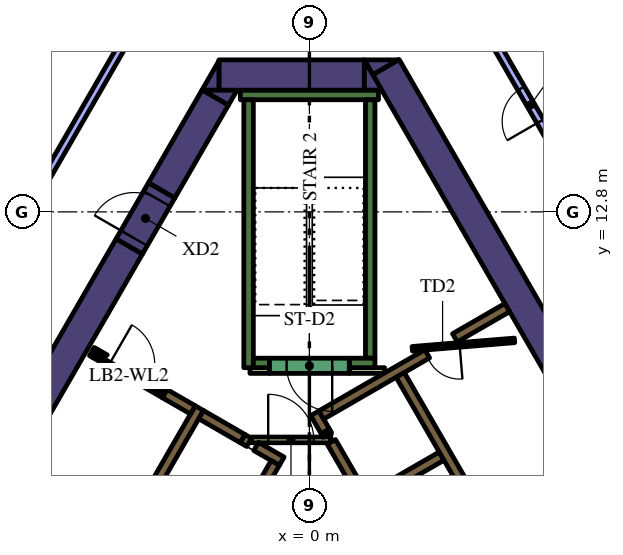
"""IFC4 building model, lengths in metres.
Left out: names, types, materials, properties, quantities, classifications, styles, units other than length and angle.
Written with IfcOpenShell. Run it as: python <this file> out.ifc"""

import sys

from ifc_helpers import new_model, si_unit, direction, frame, frame_2d, origin, place, context, subcontext, project, spatial, polyline, rectangle, outline, extrude, element, fill, save


model = new_model("IFC4")
c1 = context("Model", 3, precision=1e-05, world=origin(), true_north=direction((0.0, 1.0)))
c2 = subcontext(c1, "Body", "Model", "MODEL_VIEW")
j1 = project(units=[si_unit("LENGTHUNIT", "METRE"), si_unit("PLANEANGLEUNIT", "RADIAN")], contexts=[c1])
p1 = place(None, origin())
s1 = spatial("IfcSite", under=j1, at=p1, CompositionType="ELEMENT")
p2 = place(p1, origin())
s2 = spatial("IfcBuilding", under=s1, at=p2, CompositionType="ELEMENT")
p3 = place(p2, frame((0.0, 0.0, 171.0)))
s3 = spatial("IfcBuildingStorey", under=s2, at=p3, CompositionType="ELEMENT", Elevation=171.0)
p4 = place(p3, frame((8.279, 5.761, 0.0), z_axis=(0.0, 0.0, 1.0), x_axis=(-0.500010359015, 0.866019422922, 0.0)))
e1 = element("IfcWall", 1, at=p4, inside=s3, PredefinedType="SOLIDWALL", context=c2, shape_type="SweptSolid", body=[
    extrude(rectangle(XDim=12.528, YDim=0.8, at=frame_2d((6.264, 0.0))), origin(), (0.0, 0.0, 1.0), 4.2),
])
p5 = place(p3, origin())
e2 = element("IfcWall", 2, at=p5, inside=s3, PredefinedType="SOLIDWALL", context=c2, shape_type="SweptSolid", body=[
    extrude(outline(polyline([(1.443, 16.8), (2.339, 16.8), (1.667, 16.412), (1.443, 16.8)])), origin(), (0.0, 0.0, 1.0), 4.2),
])
p6 = place(p3, frame((-2.379, 16.4, 0.0), z_axis=(0.0, 0.0, 1.0), x_axis=(1.0, 0.0, 0.0)))
e3 = element("IfcWall", 3, at=p6, inside=s3, PredefinedType="SOLIDWALL", context=c2, shape_type="SweptSolid", body=[
    extrude(rectangle(XDim=3.824, YDim=0.8, at=frame_2d((1.912, 0.0))), origin(), (0.0, 0.0, 1.0), 4.2),
])
e4 = element("IfcWall", 4, at=p5, inside=s3, PredefinedType="SOLIDWALL", context=c2, shape_type="SweptSolid", body=[
    extrude(outline(polyline([(1.905, 16.0), (1.447, 16.0), (1.447, 16.793), (1.905, 16.0)])), origin(), (0.0, 0.0, 1.0), 4.2),
])
e5 = element("IfcWall", 5, at=p5, inside=s3, PredefinedType="SOLIDWALL", context=c2, shape_type="SweptSolid", body=[
    extrude(outline(polyline([(-2.829, 16.0), (-2.381, 16.776), (-2.381, 16.0), (-2.829, 16.0)])), origin(), (0.0, 0.0, 1.0), 4.2),
])
p7 = place(p3, frame((-2.477, 15.81, 0.0), z_axis=(0.0, 0.0, 1.0), x_axis=(-0.499969377405, -0.866043083026, 0.0)))
e6 = element("IfcWall", 6, at=p7, inside=s3, PredefinedType="SOLIDWALL", context=c2, shape_type="SweptSolid", body=[
    extrude(rectangle(XDim=2.824, YDim=0.8, at=frame_2d((1.412, 0.0))), origin(), (0.0, 0.0, 1.0), 4.2),
])
e7 = element("IfcWall", 7, at=p5, inside=s3, PredefinedType="SOLIDWALL", context=c2, shape_type="SweptSolid", body=[
    extrude(outline(polyline([(-1.905, 16.0), (-2.129, 15.612), (-2.801, 16.0), (-1.905, 16.0)])), origin(), (0.0, 0.0, 1.0), 4.2),
])
p8 = place(p3, frame((-12.668, -1.842, 0.0), z_axis=(0.0, 0.0, 1.0), x_axis=(0.500003640647, 0.866023301845, 0.0)))
e8 = element("IfcWall", 8, at=p8, inside=s3, PredefinedType="SOLIDWALL", context=c2, shape_type="SweptSolid", body=[
    extrude(rectangle(XDim=15.858, YDim=0.8, at=frame_2d((7.929, 0.0))), origin(), (0.0, 0.0, 1.0), 4.2),
])
p9 = place(p3, frame((-1.817, 15.875, 0.0), z_axis=(0.0, 0.0, 1.0), x_axis=(1.0, 0.0, 0.0)))
e9 = element("IfcWall", 9, at=p9, inside=s3, PredefinedType="SOLIDWALL", context=c2, shape_type="SweptSolid", body=[
    extrude(rectangle(XDim=3.634, YDim=0.25, at=frame_2d((1.817, 0.0))), origin(), (0.0, 0.0, 1.0), 4.2),
])
p10 = place(p3, frame((1.6, 8.95, 0.0), z_axis=(0.0, 0.0, 1.0), x_axis=(0.0, 1.0, 0.0)))
e10 = element("IfcWall", 10, at=p10, inside=s3, PredefinedType="SOLIDWALL", context=c2, shape_type="SweptSolid", body=[
    extrude(rectangle(XDim=6.8, YDim=0.25, at=frame_2d((3.4, 0.0))), origin(), (0.0, 0.0, 1.0), 4.2),
])
p11 = place(p3, frame((1.05, 8.825, 0.0), z_axis=(0.0, 0.0, 1.0), x_axis=(1.0, 0.0, 0.0)))
e11 = element("IfcWall", 11, at=p11, inside=s3, PredefinedType="SOLIDWALL", context=c2, shape_type="SweptSolid", body=[
    extrude(rectangle(XDim=0.675, YDim=0.25, at=frame_2d((0.337, 0.0))), origin(), (0.0, 0.0, 1.0), 4.2),
])
p12 = place(p3, frame((-1.6, 8.7, 0.0), z_axis=(0.0, 0.0, 1.0), x_axis=(0.0, 1.0, 0.0)))
e12 = element("IfcWall", 12, at=p12, inside=s3, PredefinedType="SOLIDWALL", context=c2, shape_type="SweptSolid", body=[
    extrude(rectangle(XDim=7.05, YDim=0.25, at=frame_2d((3.525, 0.0))), origin(), (0.0, 0.0, 1.0), 4.2),
])
p13 = place(p3, frame((-1.475, 8.825, 0.0), z_axis=(0.0, 0.0, 1.0), x_axis=(1.0, 0.0, 0.0)))
e13 = element("IfcWall", 13, at=p13, inside=s3, PredefinedType="SOLIDWALL", context=c2, shape_type="SweptSolid", body=[
    extrude(rectangle(XDim=0.425, YDim=0.25, at=frame_2d((0.212, 0.0))), origin(), (0.0, 0.0, 1.0), 4.2),
])
p14 = place(p3, frame((0.473, 6.93, 0.0), z_axis=(0.0, 0.0, 1.0), x_axis=(-0.49972245349, 0.866185586049, 0.0)))
e14 = element("IfcWall", 14, at=p14, inside=s3, PredefinedType="SOLIDWALL", context=c2, shape_type="SweptSolid", body=[
    extrude(rectangle(XDim=0.11, YDim=0.25, at=frame_2d((0.055, 0.0))), origin(), (0.0, 0.0, 1.0), 4.2),
])
p15 = place(p3, frame((6.568, -3.627, 0.0), z_axis=(0.0, 0.0, 1.0), x_axis=(-0.499999455981, 0.866025717874, 0.0)))
e15 = element("IfcWall", 15, at=p15, inside=s3, PredefinedType="SOLIDWALL", context=c2, shape_type="SweptSolid", body=[
    extrude(rectangle(XDim=11.978, YDim=0.25, at=frame_2d((5.989, 0.0))), origin(), (0.0, 0.0, 1.0), 4.2),
])
p16 = place(p3, frame((0.417, 7.027, 0.0), z_axis=(0.0, 0.0, 1.0), x_axis=(-0.500210807569, 0.865903659763, 0.0)))
e16 = element("IfcWall", 16, at=p16, inside=s3, PredefinedType="SOLIDWALL", context=c2, shape_type="SweptSolid", body=[
    extrude(rectangle(XDim=0.548, YDim=0.25, at=frame_2d((0.274, 0.0))), origin(), (0.0, 0.0, 1.0), 4.2),
])
p17 = place(p3, frame((3.1, 9.064, 0.0), z_axis=(0.0, 0.0, 1.0), x_axis=(-0.866030133475, -0.499991807846, 0.0)))
e17 = element("IfcWall", 17, at=p17, inside=s3, PredefinedType="SOLIDWALL", context=c2, shape_type="SweptSolid", body=[
    extrude(rectangle(XDim=3.217, YDim=0.25, at=frame_2d((1.608, 0.0))), origin(), (0.0, 0.0, 1.0), 4.2),
])
p18 = place(p3, frame((1.574, 5.274, 0.0), z_axis=(0.0, 0.0, 1.0), x_axis=(0.866028486751, 0.499994660107, 0.0)))
e18 = element("IfcWall", 18, at=p18, inside=s3, PredefinedType="SOLIDWALL", context=c2, shape_type="SweptSolid", body=[
    extrude(rectangle(XDim=2.2, YDim=0.25, at=frame_2d((1.1, 0.0))), origin(), (0.0, 0.0, 1.0), 4.2),
])
p19 = place(p3, frame((3.83, 9.486, 0.0), z_axis=(0.0, 0.0, 1.0), x_axis=(0.865986202621, 0.500067892261, 0.0)))
e19 = element("IfcWall", 19, at=p19, inside=s3, PredefinedType="SOLIDWALL", context=c2, shape_type="SweptSolid", body=[
    extrude(rectangle(XDim=1.591, YDim=0.25, at=frame_2d((0.795, 0.0))), origin(), (0.0, 0.0, 1.0), 4.2),
])
p20 = place(p3, frame((-8.06, -1.311, 0.0), z_axis=(0.0, 0.0, 1.0), x_axis=(0.50000273126, 0.866023826885, 0.0)))
e20 = element("IfcWall", 20, at=p20, inside=s3, PredefinedType="SOLIDWALL", context=c2, shape_type="SweptSolid", body=[
    extrude(rectangle(XDim=10.33, YDim=0.25, at=frame_2d((5.165, 0.0))), origin(), (0.0, 0.0, 1.0), 4.2),
])
p21 = place(p3, frame((-1.758, 6.835, 0.0), z_axis=(0.0, 0.0, 1.0), x_axis=(0.865982457891, -0.500074377092, 0.0)))
e21 = element("IfcWall", 21, at=p21, inside=s3, PredefinedType="SOLIDWALL", context=c2, shape_type="SweptSolid", body=[
    extrude(rectangle(XDim=0.2, YDim=0.25, at=frame_2d((0.1, 0.0))), origin(), (0.0, 0.0, 1.0), 4.2),
])
p22 = place(p3, frame((-1.76, 6.836, 0.0), z_axis=(0.0, 0.0, 1.0), x_axis=(-0.865952863304, 0.500125622755, 0.0)))
e22 = element("IfcWall", 22, at=p22, inside=s3, PredefinedType="SOLIDWALL", context=c2, shape_type="SweptSolid", body=[
    extrude(rectangle(XDim=1.258, YDim=0.25, at=frame_2d((0.629, 0.0))), origin(), (0.0, 0.0, 1.0), 4.2),
])
p23 = place(p3, frame((-0.728, 6.24, 0.0), z_axis=(0.0, 0.0, 1.0), x_axis=(-0.865955664968, 0.500120771724, 0.0)))
e23 = element("IfcWall", 23, at=p23, inside=s3, PredefinedType="SOLIDWALL", context=c2, shape_type="SweptSolid", body=[
    extrude(rectangle(XDim=0.778, YDim=0.25, at=frame_2d((0.389, 0.0))), origin(), (0.0, 0.0, 1.0), 4.2),
])
p24 = place(p3, frame((-5.725, 9.125, 0.0), z_axis=(0.0, 0.0, 1.0), x_axis=(0.866185586049, -0.49972245349, 0.0)))
e24 = element("IfcWall", 24, at=p24, inside=s3, PredefinedType="SOLIDWALL", context=c2, shape_type="SweptSolid", body=[
    extrude(rectangle(XDim=0.11, YDim=0.25, at=frame_2d((0.055, 0.0))), origin(), (0.0, 0.0, 1.0), 4.2),
])
p25 = place(p3, frame((-3.066, 7.59, 0.0), z_axis=(0.0, 0.0, 1.0), x_axis=(-0.866081358704, 0.49990307071, 0.0)))
e25 = element("IfcWall", 25, at=p25, inside=s3, PredefinedType="SOLIDWALL", context=c2, shape_type="SweptSolid", body=[
    extrude(rectangle(XDim=0.858, YDim=0.25, at=frame_2d((0.429, 0.0))), origin(), (0.0, 0.0, 1.0), 4.2),
])
e26 = element("IfcWall", 26, at=p5, inside=s3, PredefinedType="SOLIDWALL", context=c2, shape_type="SweptSolid", body=[
    extrude(outline(polyline([(-3.748, 8.128), (-3.813, 8.015), (-4.027, 8.139), (-4.017, 8.156), (-4.008, 8.173), (-4.0, 8.192), (-3.995, 8.21), (-3.991, 8.23), (-3.99, 8.25), (-3.99, 8.268), (-3.748, 8.128)])), origin(), (0.0, 0.0, 1.0), 4.2),
])
e27 = element("IfcWall", 27, at=p5, inside=s3, PredefinedType="SOLIDWALL", context=c2, shape_type="SweptSolid", body=[
    extrude(outline(polyline([(-5.689, 8.96), (-5.69, 8.961), (-5.565, 9.177), (-5.319, 9.035), (-5.335, 9.026), (-5.351, 9.015), (-5.366, 9.002), (-5.379, 8.988), (-5.392, 8.972), (-5.402, 8.956), (-5.412, 8.939), (-5.629, 9.064), (-5.629, 9.064), (-5.689, 8.96)])), origin(), (0.0, 0.0, 1.0), 4.2),
])
p26 = place(p3, frame((1.05, 8.625, 0.0), z_axis=(0.0, 0.0, 1.0), x_axis=(1.0, 0.0, 0.0)))
e28 = element("IfcWall", 28, at=p26, inside=s3, PredefinedType="PARTITIONING", context=c2, shape_type="SweptSolid", body=[
    extrude(rectangle(XDim=0.929, YDim=0.15, at=frame_2d((0.464, 0.0))), origin(), (0.0, 0.0, 1.0), 3.15),
])
p27 = place(p3, frame((-1.564, 8.625, 0.0), z_axis=(0.0, 0.0, 1.0), x_axis=(1.0, 0.0, 0.0)))
e29 = element("IfcWall", 29, at=p27, inside=s3, PredefinedType="PARTITIONING", context=c2, shape_type="SweptSolid", body=[
    extrude(rectangle(XDim=0.514, YDim=0.15, at=frame_2d((0.257, 0.0))), origin(), (0.0, 0.0, 1.0), 3.15),
])
p28 = place(p3, frame((8.565, -2.185, 0.0), z_axis=(0.0, 0.0, 1.0), x_axis=(-0.499997954832, 0.866026584559, 0.0)))
e30 = element("IfcWall", 30, at=p28, inside=s3, PredefinedType="SOLIDWALL", context=c2, shape_type="SweptSolid", body=[
    extrude(rectangle(XDim=12.35, YDim=0.25, at=frame_2d((6.175, 0.0))), origin(), (0.0, 0.0, 1.0), 4.2),
])
p29 = place(p28, frame((0.585, 0.0, 0.0)))
e31 = element("IfcOpeningElement", 31, at=p29, cuts=e30, PredefinedType="OPENING", context=c2, shape_type="SweptSolid", body=[
    extrude(rectangle(XDim=1.1, YDim=2.1, at=frame_2d((0.55, 1.05))), frame((0.0, 0.135, 0.0), z_axis=(0.0, -1.0, 0.0), x_axis=(1.0, 0.0, 0.0)), (0.0, 0.0, 1.0), 0.27),
])
p30 = place(p3, frame((-0.898, 6.194, 0.0), z_axis=(0.0, 0.0, 1.0), x_axis=(-0.499996202215, -0.866027596426, 0.0)))
e32 = element("IfcWall", 32, at=p30, inside=s3, PredefinedType="SOLIDWALL", context=c2, shape_type="SweptSolid", body=[
    extrude(rectangle(XDim=9.83, YDim=0.25, at=frame_2d((4.915, 0.0))), origin(), (0.0, 0.0, 1.0), 4.2),
])
p31 = place(p30, frame((0.585, 0.0, 0.0)))
e33 = element("IfcOpeningElement", 33, at=p31, cuts=e32, PredefinedType="OPENING", context=c2, shape_type="SweptSolid", body=[
    extrude(rectangle(XDim=1.1, YDim=2.1, at=frame_2d((0.55, 1.05))), frame((0.0, 0.135, 0.0), z_axis=(0.0, -1.0, 0.0), x_axis=(1.0, 0.0, 0.0)), (0.0, 0.0, 1.0), 0.27),
])
p32 = place(p30, frame((3.105, 0.0, 0.0)))
e34 = element("IfcOpeningElement", 34, at=p32, cuts=e32, PredefinedType="OPENING", context=c2, shape_type="SweptSolid", body=[
    extrude(rectangle(XDim=1.1, YDim=2.1, at=frame_2d((0.55, 1.05))), frame((0.0, 0.135, 0.0), z_axis=(0.0, -1.0, 0.0), x_axis=(1.0, 0.0, 0.0)), (0.0, 0.0, 1.0), 0.27),
])
p33 = place(p30, frame((5.625, 0.0, 0.0)))
e35 = element("IfcOpeningElement", 35, at=p33, cuts=e32, PredefinedType="OPENING", context=c2, shape_type="SweptSolid", body=[
    extrude(rectangle(XDim=1.1, YDim=2.1, at=frame_2d((0.55, 1.05))), frame((0.0, 0.135, 0.0), z_axis=(0.0, -1.0, 0.0), x_axis=(1.0, 0.0, 0.0)), (0.0, 0.0, 1.0), 0.27),
])
p34 = place(p30, frame((8.145, 0.0, 0.0)))
e36 = element("IfcOpeningElement", 36, at=p34, cuts=e32, PredefinedType="OPENING", context=c2, shape_type="SweptSolid", body=[
    extrude(rectangle(XDim=1.1, YDim=2.1, at=frame_2d((0.55, 1.05))), frame((0.0, 0.135, 0.0), z_axis=(0.0, -1.0, 0.0), x_axis=(1.0, 0.0, 0.0)), (0.0, 0.0, 1.0), 0.27),
])
p35 = place(p3, frame((1.05, 8.75, 0.0), z_axis=(0.0, 0.0, 1.0), x_axis=(-1.0, 0.0, 0.0)))
e37 = element("IfcWall", 37, at=p35, inside=s3, PredefinedType="SOLIDWALL", context=c2, shape_type="SweptSolid", body=[
    extrude(rectangle(XDim=2.1, YDim=0.4, at=frame_2d((1.05, 0.0))), origin(), (0.0, 0.0, 1.0), 4.2),
])
p36 = place(p35, frame((0.45, 0.0, 0.0)))
e38 = element("IfcOpeningElement", 38, at=p36, cuts=e37, PredefinedType="OPENING", context=c2, shape_type="SweptSolid", body=[
    extrude(rectangle(XDim=1.2, YDim=2.1, at=frame_2d((0.6, 1.05))), frame((0.0, 0.21, 0.0), z_axis=(0.0, -1.0, 0.0), x_axis=(1.0, 0.0, 0.0)), (0.0, 0.0, 1.0), 0.42),
])
p37 = place(p3, frame((5.398, 9.419, 0.0), z_axis=(0.0, 0.0, 1.0), x_axis=(-0.996653416376, -0.081743303248, 0.0)))
e39 = element("IfcWall", 39, at=p37, inside=s3, PredefinedType="PARTITIONING", context=c2, shape_type="SweptSolid", body=[
    extrude(rectangle(XDim=2.7, YDim=0.12, at=frame_2d((1.35, 0.0))), origin(), (0.0, 0.0, 1.0), 3.15),
])
p38 = place(p37, frame((1.45, 0.0, 0.0)))
e40 = element("IfcOpeningElement", 40, at=p38, cuts=e39, PredefinedType="OPENING", context=c2, shape_type="SweptSolid", body=[
    extrude(rectangle(XDim=0.9, YDim=2.1, at=frame_2d((0.45, 1.05))), frame((0.0, 0.07, 0.0), z_axis=(0.0, -1.0, 0.0), x_axis=(1.0, 0.0, 0.0)), (0.0, 0.0, 1.0), 0.14),
])
p39 = place(p3, frame((-1.534, 6.8, 0.0), z_axis=(0.0, 0.0, 1.0), x_axis=(1.0, 0.0, 0.0)))
e41 = element("IfcWall", 41, at=p39, inside=s3, PredefinedType="PARTITIONING", context=c2, shape_type="SweptSolid", body=[
    extrude(rectangle(XDim=2.1, YDim=0.15, at=frame_2d((1.05, 0.0))), origin(), (0.0, 0.0, 1.0), 3.15),
])
p40 = place(p39, frame((0.45, 0.0, 0.0)))
e42 = element("IfcOpeningElement", 42, at=p40, cuts=e41, PredefinedType="OPENING", context=c2, shape_type="SweptSolid", body=[
    extrude(rectangle(XDim=1.2, YDim=2.1, at=frame_2d((0.6, 1.05))), frame((0.0, 0.085, 0.0), z_axis=(0.0, -1.0, 0.0), x_axis=(1.0, 0.0, 0.0)), (0.0, 0.0, 1.0), 0.17),
])
p41 = place(p3, frame((-5.659, 9.012, 0.0), z_axis=(0.0, 0.0, 1.0), x_axis=(0.866009402589, -0.500027713859, 0.0)))
e43 = element("IfcWall", 43, at=p41, inside=s3, PredefinedType="PARTITIONING", context=c2, shape_type="SweptSolid", body=[
    extrude(rectangle(XDim=2.1, YDim=0.12, at=frame_2d((1.05, 0.0))), origin(), (0.0, 0.0, 1.0), 3.15),
])
p42 = place(p41, frame((0.45, 0.0, 0.0)))
e44 = element("IfcOpeningElement", 44, at=p42, cuts=e43, PredefinedType="OPENING", context=c2, shape_type="SweptSolid", body=[
    extrude(rectangle(XDim=1.2, YDim=2.1, at=frame_2d((0.6, 1.05))), frame((0.0, 0.07, 0.0), z_axis=(0.0, -1.0, 0.0), x_axis=(1.0, 0.0, 0.0)), (0.0, 0.0, 1.0), 0.14),
])
p43 = place(p3, frame((-4.739, 11.892, 0.0), z_axis=(0.0, 0.0, 1.0), x_axis=(0.500062241894, 0.865989465428, 0.0)))
e45 = element("IfcWall", 45, at=p43, inside=s3, PredefinedType="SOLIDWALL", context=c2, shape_type="SweptSolid", body=[
    extrude(rectangle(XDim=1.7, YDim=0.8, at=frame_2d((0.85, 0.0))), origin(), (0.0, 0.0, 1.0), 4.2),
])
p44 = place(p43, frame((0.25, 0.0, 0.0)))
e46 = element("IfcOpeningElement", 46, at=p44, cuts=e45, PredefinedType="OPENING", context=c2, shape_type="SweptSolid", body=[
    extrude(rectangle(XDim=1.2, YDim=2.1, at=frame_2d((0.6, 1.05))), frame((0.0, 0.41, 0.0), z_axis=(0.0, -1.0, 0.0), x_axis=(1.0, 0.0, 0.0)), (0.0, 0.0, 1.0), 0.82),
])
p45 = place(p3, frame((7.872, 12.064, 0.0), z_axis=(0.0, 0.0, 1.0), x_axis=(-0.499995192696, 0.866028179265, 0.0)))
e47 = element("IfcWall", 47, at=p45, inside=s3, PredefinedType="PARTITIONING", context=c2, shape_type="SweptSolid", body=[
    extrude(rectangle(XDim=8.239, YDim=0.2, at=frame_2d((4.12, 0.0))), origin(), (0.0, 0.0, 1.0), 3.15),
])
p46 = place(p45, frame((3.6, 0.0, 0.0)))
e48 = element("IfcOpeningElement", 48, at=p46, cuts=e47, PredefinedType="OPENING", context=c2, shape_type="SweptSolid", body=[
    extrude(rectangle(XDim=1.0, YDim=2.1, at=frame_2d((0.5, 1.05))), frame((0.0, 0.11, 0.0), z_axis=(0.0, -1.0, 0.0), x_axis=(1.0, 0.0, 0.0)), (0.0, 0.0, 1.0), 0.22),
])
p47 = place(p3, frame((-4.757, 17.461, 0.0), z_axis=(0.0, 0.0, 1.0), x_axis=(-0.499998278779, -0.866026397529, 0.0)))
e49 = element("IfcWall", 49, at=p47, inside=s3, PredefinedType="PARTITIONING", context=c2, shape_type="SweptSolid", body=[
    extrude(rectangle(XDim=8.709, YDim=0.2, at=frame_2d((4.354, 0.0))), origin(), (0.0, 0.0, 1.0), 3.15),
])
p48 = place(p36, origin())
e50 = element("IfcDoor", 50, at=p48, inside=s3, OperationType="SINGLE_SWING_LEFT", PredefinedType="DOOR", context=c2, shape_type="SweptSolid", body=[
    extrude(rectangle(XDim=1.2, YDim=2.1, at=frame_2d((0.6, 1.05))), frame((0.0, 0.025, 0.0), z_axis=(0.0, -1.0, 0.0), x_axis=(1.0, 0.0, 0.0)), (0.0, 0.0, 1.0), 0.05),
])
fill(e38, e50)
p49 = place(p38, origin())
e51 = element("IfcDoor", 51, at=p49, inside=s3, OperationType="SINGLE_SWING_LEFT", PredefinedType="DOOR", context=c2, shape_type="SweptSolid", body=[
    extrude(rectangle(XDim=0.9, YDim=2.1, at=frame_2d((0.45, 1.05))), frame((0.0, 0.025, 0.0), z_axis=(0.0, -1.0, 0.0), x_axis=(1.0, 0.0, 0.0)), (0.0, 0.0, 1.0), 0.05),
])
fill(e40, e51)
p50 = place(p40, origin())
e52 = element("IfcDoor", 52, at=p50, inside=s3, OperationType="SINGLE_SWING_LEFT", PredefinedType="DOOR", context=c2, shape_type="SweptSolid", body=[
    extrude(rectangle(XDim=1.2, YDim=2.1, at=frame_2d((0.6, 1.05))), frame((0.0, 0.025, 0.0), z_axis=(0.0, -1.0, 0.0), x_axis=(1.0, 0.0, 0.0)), (0.0, 0.0, 1.0), 0.05),
])
fill(e42, e52)
p51 = place(p42, origin())
e53 = element("IfcDoor", 53, at=p51, inside=s3, OperationType="SINGLE_SWING_LEFT", PredefinedType="DOOR", context=c2, shape_type="SweptSolid", body=[
    extrude(rectangle(XDim=1.2, YDim=2.1, at=frame_2d((0.6, 1.05))), frame((0.0, 0.025, 0.0), z_axis=(0.0, -1.0, 0.0), x_axis=(1.0, 0.0, 0.0)), (0.0, 0.0, 1.0), 0.05),
])
fill(e44, e53)
p52 = place(p44, origin())
e54 = element("IfcDoor", 54, at=p52, inside=s3, OperationType="SINGLE_SWING_LEFT", PredefinedType="DOOR", context=c2, shape_type="SweptSolid", body=[
    extrude(rectangle(XDim=1.2, YDim=2.1, at=frame_2d((0.6, 1.05))), frame((0.0, 0.025, 0.0), z_axis=(0.0, -1.0, 0.0), x_axis=(1.0, 0.0, 0.0)), (0.0, 0.0, 1.0), 0.05),
])
fill(e46, e54)
p53 = place(p46, origin())
e55 = element("IfcDoor", 55, at=p53, inside=s3, OperationType="SINGLE_SWING_LEFT", PredefinedType="DOOR", context=c2, shape_type="SweptSolid", body=[
    extrude(rectangle(XDim=1.0, YDim=2.1, at=frame_2d((0.5, 1.05))), frame((0.0, 0.025, 0.0), z_axis=(0.0, -1.0, 0.0), x_axis=(1.0, 0.0, 0.0)), (0.0, 0.0, 1.0), 0.05),
])
fill(e48, e55)
save(model, sys.argv[1])
